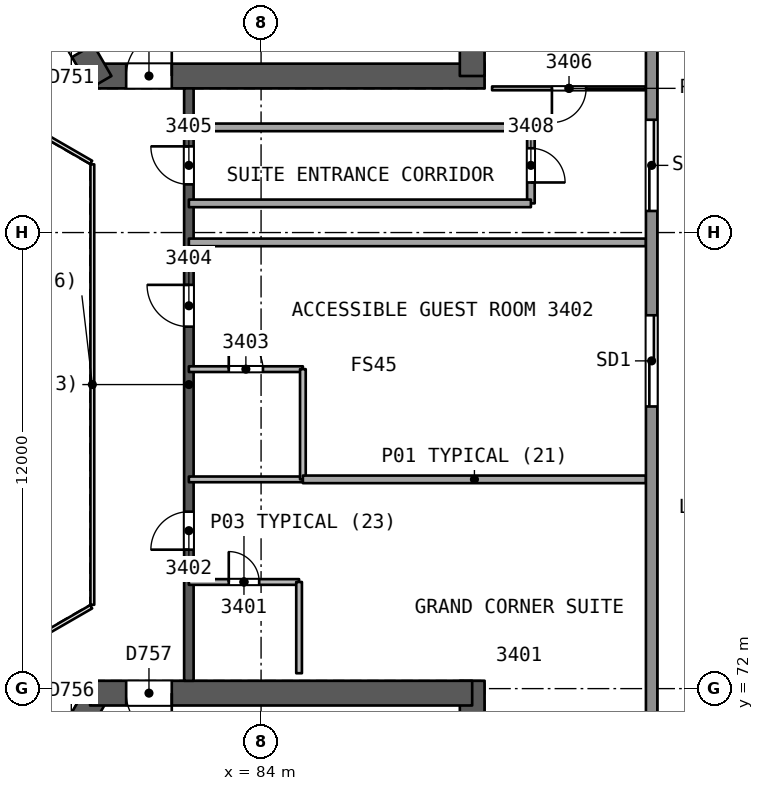
"""IFC4 building model, lengths in metres.
Left out: names, types, materials, properties, quantities, classifications, styles, units other than length and angle.
Written with IfcOpenShell. Run it as: python <this file> out.ifc"""

import sys

from ifc_helpers import new_model, si_unit, direction, frame, frame_2d, origin, place, context, subcontext, project, spatial, rectangle, extrude, element, fill, save


model = new_model("IFC4")
c1 = context("Model", 3, precision=1e-05, world=origin(), true_north=direction((0.0, 1.0)))
c2 = subcontext(c1, "Body", "Model", "MODEL_VIEW")
j1 = project(units=[si_unit("LENGTHUNIT", "METRE"), si_unit("PLANEANGLEUNIT", "RADIAN")], contexts=[c1])
p1 = place(None, origin())
s1 = spatial("IfcSite", under=j1, at=p1, CompositionType="ELEMENT")
p2 = place(p1, origin())
s2 = spatial("IfcBuilding", under=s1, at=p2, CompositionType="ELEMENT")
p3 = place(p2, frame((0.0, 0.0, 140.1)))
s3 = spatial("IfcBuildingStorey", under=s2, at=p3, CompositionType="ELEMENT", Elevation=140.1)
p4 = place(p3, frame((79.688, 88.119, 0.0), z_axis=(0.0, 0.0, 1.0), x_axis=(1.0, 0.0, 0.0)))
e1 = element("IfcWall", 1, at=p4, inside=s3, PredefinedType="SHEAR", context=c2, shape_type="SweptSolid", body=[
    extrude(rectangle(XDim=10.192, YDim=0.65, at=frame_2d((5.096, 0.0))), origin(), (0.0, 0.0, 1.0), 3.7),
])
p5 = place(p4, frame((0.762, 0.0, 0.0)))
e2 = element("IfcOpeningElement", 2, at=p5, cuts=e1, PredefinedType="OPENING", context=c2, shape_type="SweptSolid", body=[
    extrude(rectangle(XDim=1.2, YDim=2.1, at=frame_2d((0.6, 1.05))), frame((0.0, 0.335, 0.0), z_axis=(0.0, -1.0, 0.0), x_axis=(1.0, 0.0, 0.0)), (0.0, 0.0, 1.0), 0.671),
])
p6 = place(p3, frame((89.555, 88.119, 0.0), z_axis=(0.0, 0.0, 1.0), x_axis=(0.0, 1.0, 0.0)))
e3 = element("IfcWall", 3, at=p6, inside=s3, PredefinedType="SHEAR", context=c2, shape_type="SweptSolid", body=[
    extrude(rectangle(XDim=14.009, YDim=0.65, at=frame_2d((7.004, 0.0))), origin(), (0.0, 0.0, 1.0), 3.7),
])
p7 = place(p3, frame((74.754, 96.665, 0.0), z_axis=(0.0, 0.0, 1.0), x_axis=(0.500011799426, -0.866018591275, 0.0)))
e4 = element("IfcWall", 4, at=p7, inside=s3, PredefinedType="SHEAR", context=c2, shape_type="SweptSolid", body=[
    extrude(rectangle(XDim=10.055, YDim=0.65, at=frame_2d((5.027, 0.0))), origin(), (0.0, 0.0, 1.0), 3.7),
])
p8 = place(p7, frame((7.905, 0.0, 0.0)))
e5 = element("IfcOpeningElement", 5, at=p8, cuts=e4, PredefinedType="OPENING", context=c2, shape_type="SweptSolid", body=[
    extrude(rectangle(XDim=1.2, YDim=2.1, at=frame_2d((0.6, 1.05))), frame((0.0, 0.335, 0.0), z_axis=(0.0, -1.0, 0.0), x_axis=(1.0, 0.0, 0.0)), (0.0, 0.0, 1.0), 0.671),
])
p9 = place(p3, frame((79.688, 71.881, 0.0), z_axis=(0.0, 0.0, 1.0), x_axis=(-0.49999822179, -0.866026430432, 0.0)))
e6 = element("IfcWall", 6, at=p9, inside=s3, PredefinedType="SHEAR", context=c2, shape_type="SweptSolid", body=[
    extrude(rectangle(XDim=10.192, YDim=0.65, at=frame_2d((5.096, 0.0))), origin(), (0.0, 0.0, 1.0), 3.7),
])
p10 = place(p9, frame((0.762, 0.0, 0.0)))
e7 = element("IfcOpeningElement", 7, at=p10, cuts=e6, PredefinedType="OPENING", context=c2, shape_type="SweptSolid", body=[
    extrude(rectangle(XDim=1.2, YDim=2.1, at=frame_2d((0.6, 1.05))), frame((0.0, 0.335, 0.0), z_axis=(0.0, -1.0, 0.0), x_axis=(1.0, 0.0, 0.0)), (0.0, 0.0, 1.0), 0.671),
])
p11 = place(p3, frame((89.555, 58.06, 0.0), z_axis=(0.0, 0.0, 1.0), x_axis=(0.0, 1.0, 0.0)))
e8 = element("IfcWall", 8, at=p11, inside=s3, PredefinedType="SHEAR", context=c2, shape_type="SweptSolid", body=[
    extrude(rectangle(XDim=14.146, YDim=0.65, at=frame_2d((7.073, 0.0))), origin(), (0.0, 0.0, 1.0), 3.7),
])
p12 = place(p3, frame((89.555, 71.881, 0.0), z_axis=(0.0, 0.0, 1.0), x_axis=(-1.0, 0.0, 0.0)))
e9 = element("IfcWall", 9, at=p12, inside=s3, PredefinedType="SHEAR", context=c2, shape_type="SweptSolid", body=[
    extrude(rectangle(XDim=10.055, YDim=0.65, at=frame_2d((5.027, 0.0))), origin(), (0.0, 0.0, 1.0), 3.7),
])
p13 = place(p12, frame((7.905, 0.0, 0.0)))
e10 = element("IfcOpeningElement", 10, at=p13, cuts=e9, PredefinedType="OPENING", context=c2, shape_type="SweptSolid", body=[
    extrude(rectangle(XDim=1.2, YDim=2.1, at=frame_2d((0.6, 1.05))), frame((0.0, 0.335, 0.0), z_axis=(0.0, -1.0, 0.0), x_axis=(1.0, 0.0, 0.0)), (0.0, 0.0, 1.0), 0.671),
])
p14 = place(p3, frame((82.1, 72.206, 0.0), z_axis=(0.0, 0.0, 1.0), x_axis=(0.0, 1.0, 0.0)))
e11 = element("IfcWall", 11, at=p14, inside=s3, PredefinedType="SHEAR", context=c2, shape_type="SweptSolid", body=[
    extrude(rectangle(XDim=15.588, YDim=0.25, at=frame_2d((7.794, 0.0))), origin(), (0.0, 0.0, 1.0), 3.25),
])
p15 = place(p14, frame((3.45, 0.0, 0.0)))
e12 = element("IfcOpeningElement", 12, at=p15, cuts=e11, PredefinedType="OPENING", context=c2, shape_type="SweptSolid", body=[
    extrude(rectangle(XDim=1.0, YDim=2.1, at=frame_2d((0.5, 1.05))), frame((0.0, 0.135, 0.0), z_axis=(0.0, -1.0, 0.0), x_axis=(1.0, 0.0, 0.0)), (0.0, 0.0, 1.0), 0.271),
])
p16 = place(p14, frame((9.318, 0.0, 0.0)))
e13 = element("IfcOpeningElement", 13, at=p16, cuts=e11, PredefinedType="OPENING", context=c2, shape_type="SweptSolid", body=[
    extrude(rectangle(XDim=1.1, YDim=2.1, at=frame_2d((0.55, 1.05))), frame((0.0, 0.135, 0.0), z_axis=(0.0, -1.0, 0.0), x_axis=(1.0, 0.0, 0.0)), (0.0, 0.0, 1.0), 0.271),
])
p17 = place(p14, frame((13.062, 0.0, 0.0)))
e14 = element("IfcOpeningElement", 14, at=p17, cuts=e11, PredefinedType="OPENING", context=c2, shape_type="SweptSolid", body=[
    extrude(rectangle(XDim=1.0, YDim=2.1, at=frame_2d((0.5, 1.05))), frame((0.0, 0.135, 0.0), z_axis=(0.0, -1.0, 0.0), x_axis=(1.0, 0.0, 0.0)), (0.0, 0.0, 1.0), 0.271),
])
p18 = place(p3, frame((82.1, 74.806, 0.0), z_axis=(0.0, 0.0, 1.0), x_axis=(1.0, 0.0, 0.0)))
e15 = element("IfcWall", 15, at=p18, inside=s3, PredefinedType="PARTITIONING", context=c2, shape_type="SweptSolid", body=[
    extrude(rectangle(XDim=2.9, YDim=0.15, at=frame_2d((1.45, 0.0))), origin(), (0.0, 0.0, 1.0), 3.25),
])
p19 = place(p18, frame((1.05, 0.0, 0.0)))
e16 = element("IfcOpeningElement", 16, at=p19, cuts=e15, PredefinedType="OPENING", context=c2, shape_type="SweptSolid", body=[
    extrude(rectangle(XDim=0.8, YDim=2.1, at=frame_2d((0.4, 1.05))), frame((0.0, 0.085, 0.0), z_axis=(0.0, -1.0, 0.0), x_axis=(1.0, 0.0, 0.0)), (0.0, 0.0, 1.0), 0.171),
])
p20 = place(p3, frame((85.0, 74.806, 0.0), z_axis=(0.0, 0.0, 1.0), x_axis=(0.0, -1.0, 0.0)))
e17 = element("IfcWall", 17, at=p20, inside=s3, PredefinedType="PARTITIONING", context=c2, shape_type="SweptSolid", body=[
    extrude(rectangle(XDim=2.401, YDim=0.15, at=frame_2d((1.2, 0.0))), origin(), (0.0, 0.0, 1.0), 3.25),
])
p21 = place(p3, frame((94.128, 77.506, 0.0), z_axis=(0.0, 0.0, 1.0), x_axis=(-1.0, 0.0, 0.0)))
e18 = element("IfcWall", 18, at=p21, inside=s3, PredefinedType="PARTITIONING", context=c2, shape_type="SweptSolid", body=[
    extrude(rectangle(XDim=9.028, YDim=0.2, at=frame_2d((4.514, 0.0))), origin(), (0.0, 0.0, 1.0), 3.25),
])
p22 = place(p3, frame((85.1, 77.506, 0.0), z_axis=(0.0, 0.0, 1.0), x_axis=(-1.0, 0.0, 0.0)))
e19 = element("IfcWall", 19, at=p22, inside=s3, PredefinedType="PARTITIONING", context=c2, shape_type="SweptSolid", body=[
    extrude(rectangle(XDim=3.0, YDim=0.15, at=frame_2d((1.5, 0.0))), origin(), (0.0, 0.0, 1.0), 3.25),
])
p23 = place(p3, frame((82.1, 80.406, 0.0), z_axis=(0.0, 0.0, 1.0), x_axis=(1.0, 0.0, 0.0)))
e20 = element("IfcWall", 20, at=p23, inside=s3, PredefinedType="PARTITIONING", context=c2, shape_type="SweptSolid", body=[
    extrude(rectangle(XDim=3.0, YDim=0.15, at=frame_2d((1.5, 0.0))), origin(), (0.0, 0.0, 1.0), 3.25),
])
p24 = place(p23, frame((1.05, 0.0, 0.0)))
e21 = element("IfcOpeningElement", 21, at=p24, cuts=e20, PredefinedType="OPENING", context=c2, shape_type="SweptSolid", body=[
    extrude(rectangle(XDim=0.9, YDim=2.1, at=frame_2d((0.45, 1.05))), frame((0.0, 0.085, 0.0), z_axis=(0.0, -1.0, 0.0), x_axis=(1.0, 0.0, 0.0)), (0.0, 0.0, 1.0), 0.171),
])
p25 = place(p3, frame((85.1, 80.406, 0.0), z_axis=(0.0, 0.0, 1.0), x_axis=(0.0, -1.0, 0.0)))
e22 = element("IfcWall", 22, at=p25, inside=s3, PredefinedType="PARTITIONING", context=c2, shape_type="SweptSolid", body=[
    extrude(rectangle(XDim=2.9, YDim=0.15, at=frame_2d((1.45, 0.0))), origin(), (0.0, 0.0, 1.0), 3.25),
])
p26 = place(p3, frame((94.128, 83.741, 0.0), z_axis=(0.0, 0.0, 1.0), x_axis=(-1.0, 0.0, 0.0)))
e23 = element("IfcWall", 23, at=p26, inside=s3, PredefinedType="PARTITIONING", context=c2, shape_type="SweptSolid", body=[
    extrude(rectangle(XDim=12.028, YDim=0.2, at=frame_2d((6.014, 0.0))), origin(), (0.0, 0.0, 1.0), 3.25),
])
p27 = place(p3, frame((94.128, 87.794, 0.0), z_axis=(0.0, 0.0, 1.0), x_axis=(-1.0, 0.0, 0.0)))
e24 = element("IfcWall", 24, at=p27, inside=s3, PredefinedType="PARTITIONING", context=c2, shape_type="SweptSolid", body=[
    extrude(rectangle(XDim=4.049, YDim=0.1, at=frame_2d((2.024, 0.0))), origin(), (0.0, 0.0, 1.0), 3.25),
])
p28 = place(p27, frame((1.575, 0.0, 0.0)))
e25 = element("IfcOpeningElement", 25, at=p28, cuts=e24, PredefinedType="OPENING", context=c2, shape_type="SweptSolid", body=[
    extrude(rectangle(XDim=0.9, YDim=2.1, at=frame_2d((0.45, 1.05))), frame((0.0, 0.061, 0.0), z_axis=(0.0, -1.0, 0.0), x_axis=(1.0, 0.0, 0.0)), (0.0, 0.0, 1.0), 0.121),
])
p29 = place(p3, frame((82.1, 86.768, 0.0), z_axis=(0.0, 0.0, 1.0), x_axis=(1.0, 0.0, 0.0)))
e26 = element("IfcWall", 26, at=p29, inside=s3, PredefinedType="PARTITIONING", context=c2, shape_type="SweptSolid", body=[
    extrude(rectangle(XDim=9.0, YDim=0.2, at=frame_2d((4.5, 0.0))), origin(), (0.0, 0.0, 1.0), 3.25),
])
p30 = place(p3, frame((91.1, 86.768, 0.0), z_axis=(0.0, 0.0, 1.0), x_axis=(0.0, -1.0, 0.0)))
e27 = element("IfcWall", 27, at=p30, inside=s3, PredefinedType="PARTITIONING", context=c2, shape_type="SweptSolid", body=[
    extrude(rectangle(XDim=2.0, YDim=0.2, at=frame_2d((1.0, 0.0))), origin(), (0.0, 0.0, 1.0), 3.25),
])
p31 = place(p30, frame((0.55, 0.0, 0.0)))
e28 = element("IfcOpeningElement", 28, at=p31, cuts=e27, PredefinedType="OPENING", context=c2, shape_type="SweptSolid", body=[
    extrude(rectangle(XDim=0.9, YDim=2.1, at=frame_2d((0.45, 1.05))), frame((0.0, 0.11, 0.0), z_axis=(0.0, -1.0, 0.0), x_axis=(1.0, 0.0, 0.0)), (0.0, 0.0, 1.0), 0.221),
])
p32 = place(p3, frame((91.1, 84.768, 0.0), z_axis=(0.0, 0.0, 1.0), x_axis=(-1.0, 0.0, 0.0)))
e29 = element("IfcWall", 29, at=p32, inside=s3, PredefinedType="PARTITIONING", context=c2, shape_type="SweptSolid", body=[
    extrude(rectangle(XDim=9.0, YDim=0.2, at=frame_2d((4.5, 0.0))), origin(), (0.0, 0.0, 1.0), 3.25),
])
p33 = place(p3, frame((94.277, 107.717, 0.0), z_axis=(0.0, 0.0, 1.0), x_axis=(0.0, -1.0, 0.0)))
e30 = element("IfcWall", 30, at=p33, inside=s3, PredefinedType="SOLIDWALL", context=c2, shape_type="SweptSolid", body=[
    extrude(rectangle(XDim=55.435, YDim=0.3, at=frame_2d((27.717, 0.0))), origin(), (0.0, 0.0, 1.0), 3.25),
])
p34 = place(p33, frame((25.894, 0.0, 0.0)))
e31 = element("IfcOpeningElement", 31, at=p34, cuts=e30, PredefinedType="OPENING", context=c2, shape_type="SweptSolid", body=[
    extrude(rectangle(XDim=2.4, YDim=2.4, at=frame_2d((1.2, 1.2))), frame((0.0, 0.161, 0.0), z_axis=(0.0, -1.0, 0.0), x_axis=(1.0, 0.0, 0.0)), (0.0, 0.0, 1.0), 0.321),
])
p35 = place(p33, frame((20.75, 0.0, 0.0)))
e32 = element("IfcOpeningElement", 32, at=p35, cuts=e30, PredefinedType="OPENING", context=c2, shape_type="SweptSolid", body=[
    extrude(rectangle(XDim=2.4, YDim=2.4, at=frame_2d((1.2, 1.2))), frame((0.0, 0.161, 0.0), z_axis=(0.0, -1.0, 0.0), x_axis=(1.0, 0.0, 0.0)), (0.0, 0.0, 1.0), 0.321),
])
p36 = place(p33, frame((10.014, 0.0, 0.0)))
e33 = element("IfcOpeningElement", 33, at=p36, cuts=e30, PredefinedType="OPENING", context=c2, shape_type="SweptSolid", body=[
    extrude(rectangle(XDim=2.4, YDim=2.4, at=frame_2d((1.2, 1.2))), frame((0.0, 0.161, 0.0), z_axis=(0.0, -1.0, 0.0), x_axis=(1.0, 0.0, 0.0)), (0.0, 0.0, 1.0), 0.321),
])
p37 = place(p33, frame((41.666, 0.0, 0.0)))
e34 = element("IfcOpeningElement", 34, at=p37, cuts=e30, PredefinedType="OPENING", context=c2, shape_type="SweptSolid", body=[
    extrude(rectangle(XDim=2.4, YDim=2.4, at=frame_2d((1.2, 1.2))), frame((0.0, 0.161, 0.0), z_axis=(0.0, -1.0, 0.0), x_axis=(1.0, 0.0, 0.0)), (0.0, 0.0, 1.0), 0.321),
])
p38 = place(p3, frame((41.358, 82.836, 0.0), z_axis=(0.0, 0.0, 1.0), x_axis=(0.866024602029, 0.500001388679, 0.0)))
e35 = element("IfcWall", 35, at=p38, inside=s3, PredefinedType="SOLIDWALL", context=c2, shape_type="SweptSolid", body=[
    extrude(rectangle(XDim=55.434, YDim=0.3, at=frame_2d((27.717, 0.0))), origin(), (0.0, 0.0, 1.0), 3.25),
])
p39 = place(p38, frame((26.361, 0.0, 0.0)))
e36 = element("IfcOpeningElement", 36, at=p39, cuts=e35, PredefinedType="OPENING", context=c2, shape_type="SweptSolid", body=[
    extrude(rectangle(XDim=2.4, YDim=2.4, at=frame_2d((1.2, 1.2))), frame((0.0, 0.161, 0.0), z_axis=(0.0, -1.0, 0.0), x_axis=(1.0, 0.0, 0.0)), (0.0, 0.0, 1.0), 0.321),
])
p40 = place(p38, frame((31.194, 0.0, 0.0)))
e37 = element("IfcOpeningElement", 37, at=p40, cuts=e35, PredefinedType="OPENING", context=c2, shape_type="SweptSolid", body=[
    extrude(rectangle(XDim=2.4, YDim=2.4, at=frame_2d((1.2, 1.2))), frame((0.0, 0.161, 0.0), z_axis=(0.0, -1.0, 0.0), x_axis=(1.0, 0.0, 0.0)), (0.0, 0.0, 1.0), 0.321),
])
p41 = place(p38, frame((43.056, 0.0, 0.0)))
e38 = element("IfcOpeningElement", 38, at=p41, cuts=e35, PredefinedType="OPENING", context=c2, shape_type="SweptSolid", body=[
    extrude(rectangle(XDim=2.4, YDim=2.4, at=frame_2d((1.2, 1.2))), frame((0.0, 0.161, 0.0), z_axis=(0.0, -1.0, 0.0), x_axis=(1.0, 0.0, 0.0)), (0.0, 0.0, 1.0), 0.321),
])
p42 = place(p38, frame((11.68, 0.0, 0.0)))
e39 = element("IfcOpeningElement", 39, at=p42, cuts=e35, PredefinedType="OPENING", context=c2, shape_type="SweptSolid", body=[
    extrude(rectangle(XDim=2.4, YDim=2.4, at=frame_2d((1.2, 1.2))), frame((0.0, 0.161, 0.0), z_axis=(0.0, -1.0, 0.0), x_axis=(1.0, 0.0, 0.0)), (0.0, 0.0, 1.0), 0.321),
])
p43 = place(p3, frame((89.365, 49.447, 0.0), z_axis=(0.0, 0.0, 1.0), x_axis=(-0.866024602029, 0.500001388679, 0.0)))
e40 = element("IfcWall", 40, at=p43, inside=s3, PredefinedType="SOLIDWALL", context=c2, shape_type="SweptSolid", body=[
    extrude(rectangle(XDim=55.434, YDim=0.3, at=frame_2d((27.717, 0.0))), origin(), (0.0, 0.0, 1.0), 3.25),
])
p44 = place(p43, frame((31.194, 0.0, 0.0)))
e41 = element("IfcOpeningElement", 41, at=p44, cuts=e40, PredefinedType="OPENING", context=c2, shape_type="SweptSolid", body=[
    extrude(rectangle(XDim=2.4, YDim=2.4, at=frame_2d((1.2, 1.2))), frame((0.0, 0.161, 0.0), z_axis=(0.0, -1.0, 0.0), x_axis=(1.0, 0.0, 0.0)), (0.0, 0.0, 1.0), 0.321),
])
p45 = place(p43, frame((43.056, 0.0, 0.0)))
e42 = element("IfcOpeningElement", 42, at=p45, cuts=e40, PredefinedType="OPENING", context=c2, shape_type="SweptSolid", body=[
    extrude(rectangle(XDim=2.4, YDim=2.4, at=frame_2d((1.2, 1.2))), frame((0.0, 0.161, 0.0), z_axis=(0.0, -1.0, 0.0), x_axis=(1.0, 0.0, 0.0)), (0.0, 0.0, 1.0), 0.321),
])
p46 = place(p43, frame((21.529, 0.0, 0.0)))
e43 = element("IfcOpeningElement", 43, at=p46, cuts=e40, PredefinedType="OPENING", context=c2, shape_type="SweptSolid", body=[
    extrude(rectangle(XDim=2.4, YDim=2.4, at=frame_2d((1.2, 1.2))), frame((0.0, 0.161, 0.0), z_axis=(0.0, -1.0, 0.0), x_axis=(1.0, 0.0, 0.0)), (0.0, 0.0, 1.0), 0.321),
])
p47 = place(p43, frame((10.014, 0.0, 0.0)))
e44 = element("IfcOpeningElement", 44, at=p47, cuts=e40, PredefinedType="OPENING", context=c2, shape_type="SweptSolid", body=[
    extrude(rectangle(XDim=2.4, YDim=2.4, at=frame_2d((1.2, 1.2))), frame((0.0, 0.161, 0.0), z_axis=(0.0, -1.0, 0.0), x_axis=(1.0, 0.0, 0.0)), (0.0, 0.0, 1.0), 0.321),
])
p48 = place(p43, frame((26.205, 0.0, 0.0)))
e45 = element("IfcOpeningElement", 45, at=p48, cuts=e40, PredefinedType="OPENING", context=c2, shape_type="SweptSolid", body=[
    extrude(rectangle(XDim=2.4, YDim=2.4, at=frame_2d((1.2, 1.2))), frame((0.0, 0.161, 0.0), z_axis=(0.0, -1.0, 0.0), x_axis=(1.0, 0.0, 0.0)), (0.0, 0.0, 1.0), 0.321),
])
p49 = place(p3, frame((79.56, 74.206, 0.0), z_axis=(0.0, 0.0, 1.0), x_axis=(0.0, 1.0, 0.0)))
e46 = element("IfcWall", 46, at=p49, inside=s3, PredefinedType="PARTITIONING", context=c2, shape_type="SweptSolid", body=[
    extrude(rectangle(XDim=11.588, YDim=0.1, at=frame_2d((5.794, 0.0))), origin(), (0.0, 0.0, 1.0), 3.25),
])
for number, where, z_axis, x_axis in (
    (47, (79.53, 85.846, 0.0), (0.0, 0.0, 1.0), (-0.866, 0.5, 0.0)),
    (48, (77.798, 73.154, 0.0), (0.0, 0.0, 1.0), (0.866, 0.5, 0.0)),
):
    element("IfcWall", number, at=place(p3, frame(where, z_axis=z_axis, x_axis=x_axis)), inside=s3, PredefinedType="PARTITIONING", context=c2, shape_type="SweptSolid", body=[
        extrude(rectangle(XDim=2.0, YDim=0.1, at=frame_2d((1.0, 0.0))), origin(), (0.0, 0.0, 1.0), 3.25),
    ])
p50 = place(p19, origin())
e49 = element("IfcDoor", 49, at=p50, inside=s3, OperationType="SINGLE_SWING_LEFT", PredefinedType="NOTDEFINED", context=c2, shape_type="SweptSolid", body=[
    extrude(rectangle(XDim=0.8, YDim=2.1, at=frame_2d((0.4, 1.05))), frame((0.0, 0.025, 0.0), z_axis=(0.0, -1.0, 0.0), x_axis=(1.0, 0.0, 0.0)), (0.0, 0.0, 1.0), 0.05),
])
fill(e16, e49)
p51 = place(p15, origin())
e50 = element("IfcDoor", 50, at=p51, inside=s3, OperationType="SINGLE_SWING_LEFT", PredefinedType="NOTDEFINED", context=c2, shape_type="SweptSolid", body=[
    extrude(rectangle(XDim=1.0, YDim=2.1, at=frame_2d((0.5, 1.05))), frame((0.0, 0.025, 0.0), z_axis=(0.0, -1.0, 0.0), x_axis=(1.0, 0.0, 0.0)), (0.0, 0.0, 1.0), 0.05),
])
fill(e12, e50)
p52 = place(p24, origin())
e51 = element("IfcDoor", 51, at=p52, inside=s3, OperationType="SINGLE_SWING_LEFT", PredefinedType="NOTDEFINED", context=c2, shape_type="SweptSolid", body=[
    extrude(rectangle(XDim=0.9, YDim=2.1, at=frame_2d((0.45, 1.05))), frame((0.0, 0.025, 0.0), z_axis=(0.0, -1.0, 0.0), x_axis=(1.0, 0.0, 0.0)), (0.0, 0.0, 1.0), 0.05),
])
fill(e21, e51)
p53 = place(p16, origin())
e52 = element("IfcDoor", 52, at=p53, inside=s3, OperationType="SINGLE_SWING_RIGHT", PredefinedType="NOTDEFINED", context=c2, shape_type="SweptSolid", body=[
    extrude(rectangle(XDim=1.1, YDim=2.1, at=frame_2d((0.55, 1.05))), frame((0.0, 0.025, 0.0), z_axis=(0.0, -1.0, 0.0), x_axis=(1.0, 0.0, 0.0)), (0.0, 0.0, 1.0), 0.05),
])
fill(e13, e52)
p54 = place(p17, origin())
e53 = element("IfcDoor", 53, at=p54, inside=s3, OperationType="SINGLE_SWING_RIGHT", PredefinedType="NOTDEFINED", context=c2, shape_type="SweptSolid", body=[
    extrude(rectangle(XDim=1.0, YDim=2.1, at=frame_2d((0.5, 1.05))), frame((0.0, 0.025, 0.0), z_axis=(0.0, -1.0, 0.0), x_axis=(1.0, 0.0, 0.0)), (0.0, 0.0, 1.0), 0.05),
])
fill(e14, e53)
p55 = place(p28, origin())
e54 = element("IfcDoor", 54, at=p55, inside=s3, OperationType="SINGLE_SWING_RIGHT", PredefinedType="NOTDEFINED", context=c2, shape_type="SweptSolid", body=[
    extrude(rectangle(XDim=0.9, YDim=2.1, at=frame_2d((0.45, 1.05))), frame((0.0, 0.025, 0.0), z_axis=(0.0, -1.0, 0.0), x_axis=(1.0, 0.0, 0.0)), (0.0, 0.0, 1.0), 0.05),
])
fill(e25, e54)
p56 = place(p31, origin())
e55 = element("IfcDoor", 55, at=p56, inside=s3, OperationType="SINGLE_SWING_RIGHT", PredefinedType="NOTDEFINED", context=c2, shape_type="SweptSolid", body=[
    extrude(rectangle(XDim=0.9, YDim=2.1, at=frame_2d((0.45, 1.05))), frame((0.0, 0.025, 0.0), z_axis=(0.0, -1.0, 0.0), x_axis=(1.0, 0.0, 0.0)), (0.0, 0.0, 1.0), 0.05),
])
fill(e28, e55)
p57 = place(p34, origin())
e56 = element("IfcDoor", 56, at=p57, inside=s3, OperationType="SLIDING_TO_LEFT", PredefinedType="NOTDEFINED", context=c2, shape_type="SweptSolid", body=[
    extrude(rectangle(XDim=2.4, YDim=2.4, at=frame_2d((1.2, 1.2))), frame((0.0, 0.025, 0.0), z_axis=(0.0, -1.0, 0.0), x_axis=(1.0, 0.0, 0.0)), (0.0, 0.0, 1.0), 0.05),
])
fill(e31, e56)
p58 = place(p35, origin())
e57 = element("IfcDoor", 57, at=p58, inside=s3, OperationType="SLIDING_TO_RIGHT", PredefinedType="NOTDEFINED", context=c2, shape_type="SweptSolid", body=[
    extrude(rectangle(XDim=2.4, YDim=2.4, at=frame_2d((1.2, 1.2))), frame((0.0, 0.025, 0.0), z_axis=(0.0, -1.0, 0.0), x_axis=(1.0, 0.0, 0.0)), (0.0, 0.0, 1.0), 0.05),
])
fill(e32, e57)
p59 = place(p5, origin())
e58 = element("IfcDoor", 58, at=p59, inside=s3, OperationType="SINGLE_SWING_RIGHT", PredefinedType="NOTDEFINED", context=c2, shape_type="SweptSolid", body=[
    extrude(rectangle(XDim=1.2, YDim=2.1, at=frame_2d((0.6, 1.05))), frame((0.0, 0.025, 0.0), z_axis=(0.0, -1.0, 0.0), x_axis=(1.0, 0.0, 0.0)), (0.0, 0.0, 1.0), 0.05),
])
fill(e2, e58)
p60 = place(p13, origin())
e59 = element("IfcDoor", 59, at=p60, inside=s3, OperationType="SINGLE_SWING_LEFT", PredefinedType="NOTDEFINED", context=c2, shape_type="SweptSolid", body=[
    extrude(rectangle(XDim=1.2, YDim=2.1, at=frame_2d((0.6, 1.05))), frame((0.0, 0.025, 0.0), z_axis=(0.0, -1.0, 0.0), x_axis=(1.0, 0.0, 0.0)), (0.0, 0.0, 1.0), 0.05),
])
fill(e10, e59)
save(model, sys.argv[1])
